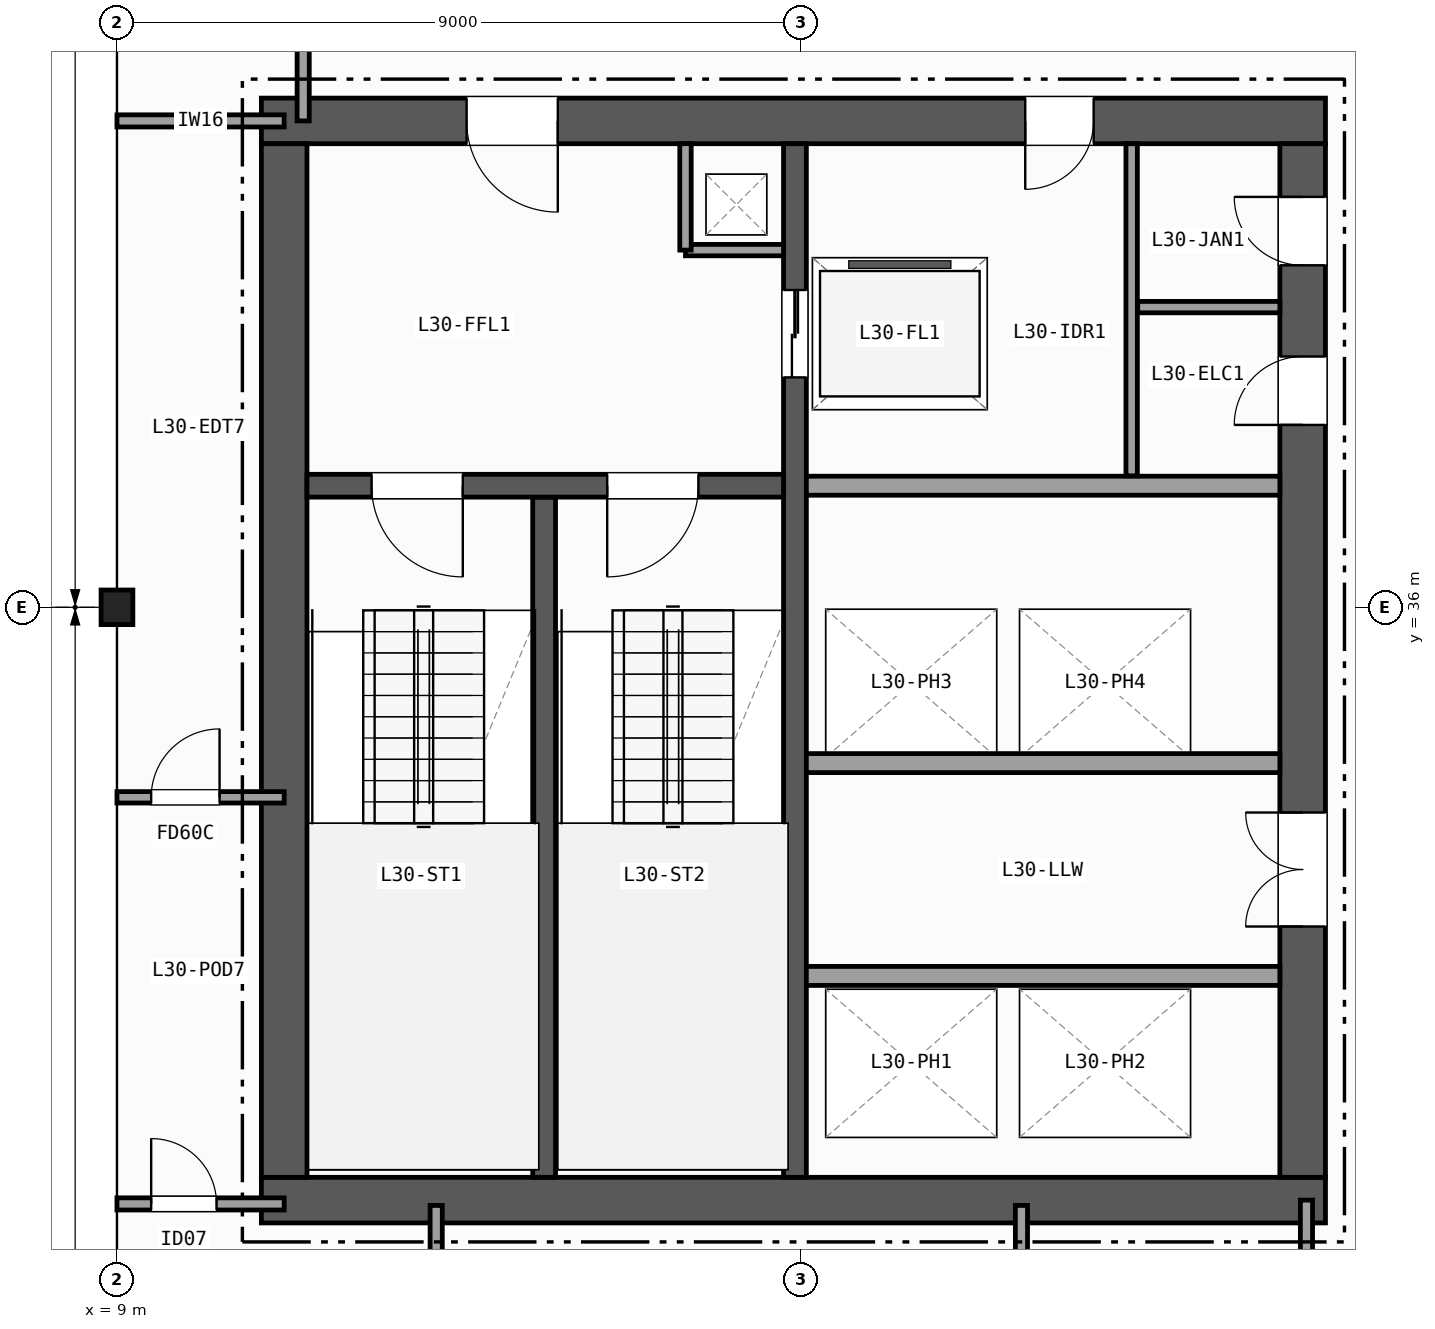
"""IFC4 building model, lengths in metres.
Left out: names, types, materials, properties, quantities, classifications, styles, units other than length and angle.
Written with IfcOpenShell. Run it as: python <this file> out.ifc"""

import sys

from ifc_helpers import new_model, si_unit, direction, frame, frame_2d, origin, origin_2d, place, context, subcontext, project, spatial, rectangle, i_section, extrude, element, fill, save


model = new_model("IFC4")
c1 = context("Model", 3, precision=1e-05, world=origin(), true_north=direction((0.0, 1.0)))
c2 = subcontext(c1, "Body", "Model", "MODEL_VIEW")
j1 = project(units=[si_unit("LENGTHUNIT", "METRE"), si_unit("PLANEANGLEUNIT", "RADIAN")], contexts=[c1])
p1 = place(None, origin())
s1 = spatial("IfcSite", under=j1, at=p1, CompositionType="ELEMENT")
p2 = place(p1, origin())
s2 = spatial("IfcBuilding", under=s1, at=p2, CompositionType="ELEMENT")
p3 = place(p2, frame((0.0, 0.0, 124.8)))
s3 = spatial("IfcBuildingStorey", under=s2, at=p3, CompositionType="ELEMENT", Elevation=124.8)
p4 = place(p3, frame((9.0, 36.0, 0.0), z_axis=(0.0, 0.0, 1.0), x_axis=(1.0, 0.0, 0.0)))
e1 = element("IfcColumn", 1, at=p4, inside=s3, PredefinedType="COLUMN", context=c2, shape_type="SweptSolid", body=[
    extrude(i_section(OverallWidth=0.418, OverallDepth=0.455, WebThickness=0.042, FlangeThickness=0.068, FilletRadius=0.015, at=origin_2d()), origin(), (0.0, 0.0, 1.0), 3.7),
])
p5 = place(p3, frame((10.9, 28.2, 0.0), z_axis=(0.0, 0.0, 1.0), x_axis=(1.0, 0.0, 0.0)))
e2 = element("IfcWall", 2, at=p5, inside=s3, PredefinedType="SHEAR", context=c2, shape_type="SweptSolid", body=[
    extrude(rectangle(XDim=14.0, YDim=0.6, at=frame_2d((7.0, 0.0))), origin(), (0.0, 0.0, 1.0), 3.42),
])
p6 = place(p3, frame((24.9, 42.4, 0.0), z_axis=(0.0, 0.0, 1.0), x_axis=(-1.0, 0.0, 0.0)))
e3 = element("IfcWall", 3, at=p6, inside=s3, PredefinedType="SHEAR", context=c2, shape_type="SweptSolid", body=[
    extrude(rectangle(XDim=14.0, YDim=0.6, at=frame_2d((7.0, 0.0))), origin(), (0.0, 0.0, 1.0), 3.42),
])
p7 = place(p6, frame((10.1, 0.0, 0.0)))
e4 = element("IfcOpeningElement", 4, at=p7, cuts=e3, PredefinedType="OPENING", context=c2, shape_type="SweptSolid", body=[
    extrude(rectangle(XDim=1.2, YDim=2.15, at=frame_2d((0.6, 1.075))), frame((0.0, 0.31, 0.0), z_axis=(0.0, -1.0, 0.0), x_axis=(1.0, 0.0, 0.0)), (0.0, 0.0, 1.0), 0.62),
])
p8 = place(p6, frame((3.05, 0.0, 0.0)))
e5 = element("IfcOpeningElement", 5, at=p8, cuts=e3, PredefinedType="OPENING", context=c2, shape_type="SweptSolid", body=[
    extrude(rectangle(XDim=0.9, YDim=2.1, at=frame_2d((0.45, 1.05))), frame((0.0, 0.31, 0.0), z_axis=(0.0, -1.0, 0.0), x_axis=(1.0, 0.0, 0.0)), (0.0, 0.0, 1.0), 0.62),
])
p9 = place(p3, frame((11.2, 42.1, 0.0), z_axis=(0.0, 0.0, 1.0), x_axis=(0.0, -1.0, 0.0)))
e6 = element("IfcWall", 6, at=p9, inside=s3, PredefinedType="SHEAR", context=c2, shape_type="SweptSolid", body=[
    extrude(rectangle(XDim=13.6, YDim=0.6, at=frame_2d((6.8, 0.0))), origin(), (0.0, 0.0, 1.0), 3.42),
])
p10 = place(p3, frame((24.6, 28.5, 0.0), z_axis=(0.0, 0.0, 1.0), x_axis=(0.0, 1.0, 0.0)))
e7 = element("IfcWall", 7, at=p10, inside=s3, PredefinedType="SHEAR", context=c2, shape_type="SweptSolid", body=[
    extrude(rectangle(XDim=13.6, YDim=0.6, at=frame_2d((6.8, 0.0))), origin(), (0.0, 0.0, 1.0), 3.42),
])
p11 = place(p10, frame((3.3, 0.0, 0.0)))
e8 = element("IfcOpeningElement", 8, at=p11, cuts=e7, PredefinedType="OPENING", context=c2, shape_type="SweptSolid", body=[
    extrude(rectangle(XDim=1.5, YDim=2.2, at=frame_2d((0.75, 1.1))), frame((0.0, 0.31, 0.0), z_axis=(0.0, -1.0, 0.0), x_axis=(1.0, 0.0, 0.0)), (0.0, 0.0, 1.0), 0.62),
])
p12 = place(p10, frame((9.9, 0.0, 0.0)))
e9 = element("IfcOpeningElement", 9, at=p12, cuts=e7, PredefinedType="OPENING", context=c2, shape_type="SweptSolid", body=[
    extrude(rectangle(XDim=0.9, YDim=2.1, at=frame_2d((0.45, 1.05))), frame((0.0, 0.31, 0.0), z_axis=(0.0, -1.0, 0.0), x_axis=(1.0, 0.0, 0.0)), (0.0, 0.0, 1.0), 0.62),
])
p13 = place(p10, frame((12.0, 0.0, 0.0)))
e10 = element("IfcOpeningElement", 10, at=p13, cuts=e7, PredefinedType="OPENING", context=c2, shape_type="SweptSolid", body=[
    extrude(rectangle(XDim=0.9, YDim=2.1, at=frame_2d((0.45, 1.05))), frame((0.0, 0.31, 0.0), z_axis=(0.0, -1.0, 0.0), x_axis=(1.0, 0.0, 0.0)), (0.0, 0.0, 1.0), 0.62),
])
p14 = place(p3, frame((14.62, 28.5, 0.0), z_axis=(0.0, 0.0, 1.0), x_axis=(0.0, 1.0, 0.0)))
e11 = element("IfcWall", 11, at=p14, inside=s3, PredefinedType="SHEAR", context=c2, shape_type="SweptSolid", body=[
    extrude(rectangle(XDim=8.95, YDim=0.3, at=frame_2d((4.475, 0.0))), origin(), (0.0, 0.0, 1.0), 3.42),
])
p15 = place(p3, frame((17.92, 42.1, 0.0), z_axis=(0.0, 0.0, 1.0), x_axis=(0.0, -1.0, 0.0)))
e12 = element("IfcWall", 12, at=p15, inside=s3, PredefinedType="SHEAR", context=c2, shape_type="SweptSolid", body=[
    extrude(rectangle(XDim=13.6, YDim=0.3, at=frame_2d((6.8, 0.0))), origin(), (0.0, 0.0, 1.0), 3.42),
])
p16 = place(p15, frame((1.925, 0.0, 0.0)))
e13 = element("IfcOpeningElement", 13, at=p16, cuts=e12, PredefinedType="OPENING", context=c2, shape_type="SweptSolid", body=[
    extrude(rectangle(XDim=1.15, YDim=2.15, at=frame_2d((0.575, 1.075))), frame((0.0, 0.16, 0.0), z_axis=(0.0, -1.0, 0.0), x_axis=(1.0, 0.0, 0.0)), (0.0, 0.0, 1.0), 0.32),
])
p17 = place(p3, frame((17.77, 37.6, 0.0), z_axis=(0.0, 0.0, 1.0), x_axis=(-1.0, 0.0, 0.0)))
e14 = element("IfcWall", 14, at=p17, inside=s3, PredefinedType="SHEAR", context=c2, shape_type="SweptSolid", body=[
    extrude(rectangle(XDim=6.27, YDim=0.3, at=frame_2d((3.135, 0.0))), origin(), (0.0, 0.0, 1.0), 3.42),
])
p18 = place(p17, frame((4.22, 0.0, 0.0)))
e15 = element("IfcOpeningElement", 15, at=p18, cuts=e14, PredefinedType="OPENING", context=c2, shape_type="SweptSolid", body=[
    extrude(rectangle(XDim=1.2, YDim=2.15, at=frame_2d((0.6, 1.075))), frame((0.0, 0.16, 0.0), z_axis=(0.0, -1.0, 0.0), x_axis=(1.0, 0.0, 0.0)), (0.0, 0.0, 1.0), 0.32),
])
p19 = place(p17, frame((1.12, 0.0, 0.0)))
e16 = element("IfcOpeningElement", 16, at=p19, cuts=e14, PredefinedType="OPENING", context=c2, shape_type="SweptSolid", body=[
    extrude(rectangle(XDim=1.2, YDim=2.15, at=frame_2d((0.6, 1.075))), frame((0.0, 0.16, 0.0), z_axis=(0.0, -1.0, 0.0), x_axis=(1.0, 0.0, 0.0)), (0.0, 0.0, 1.0), 0.32),
])
p20 = place(p3, frame((16.48, 40.7, 0.0), z_axis=(0.0, 0.0, 1.0), x_axis=(1.0, 0.0, 0.0)))
e17 = element("IfcWall", 17, at=p20, inside=s3, PredefinedType="PARTITIONING", context=c2, shape_type="SweptSolid", body=[
    extrude(rectangle(XDim=1.29, YDim=0.15, at=frame_2d((0.645, 0.0))), origin(), (0.0, 0.0, 1.0), 3.42),
])
p21 = place(p3, frame((16.48, 40.7, 0.0), z_axis=(0.0, 0.0, 1.0), x_axis=(0.0, 1.0, 0.0)))
e18 = element("IfcWall", 18, at=p21, inside=s3, PredefinedType="PARTITIONING", context=c2, shape_type="SweptSolid", body=[
    extrude(rectangle(XDim=1.4, YDim=0.15, at=frame_2d((0.7, 0.0))), origin(), (0.0, 0.0, 1.0), 3.42),
])
for number, where, z_axis, x_axis in (
    (19, (18.07, 37.6, 0.0), (0.0, 0.0, 1.0), (1.0, 0.0, 0.0)),
    (20, (18.07, 31.15, 0.0), (0.0, 0.0, 1.0), (1.0, 0.0, 0.0)),
    (21, (24.3, 33.95, 0.0), (0.0, 0.0, 1.0), (-1.0, 0.0, 0.0)),
):
    element("IfcWall", number, at=place(p3, frame(where, z_axis=z_axis, x_axis=x_axis)), inside=s3, PredefinedType="PARTITIONING", context=c2, shape_type="SweptSolid", body=[
        extrude(rectangle(XDim=6.23, YDim=0.25, at=frame_2d((3.115, 0.0))), origin(), (0.0, 0.0, 1.0), 3.42),
    ])
p22 = place(p3, frame((22.35, 37.73, 0.0), z_axis=(0.0, 0.0, 1.0), x_axis=(0.0, 1.0, 0.0)))
e22 = element("IfcWall", 22, at=p22, inside=s3, PredefinedType="PARTITIONING", context=c2, shape_type="SweptSolid", body=[
    extrude(rectangle(XDim=4.37, YDim=0.15, at=frame_2d((2.185, 0.0))), origin(), (0.0, 0.0, 1.0), 3.42),
])
p23 = place(p3, frame((22.43, 39.95, 0.0), z_axis=(0.0, 0.0, 1.0), x_axis=(1.0, 0.0, 0.0)))
e23 = element("IfcWall", 23, at=p23, inside=s3, PredefinedType="PARTITIONING", context=c2, shape_type="SweptSolid", body=[
    extrude(rectangle(XDim=1.87, YDim=0.15, at=frame_2d((0.935, 0.0))), origin(), (0.0, 0.0, 1.0), 3.42),
])
p24 = place(p3, frame((9.0, 28.15, 0.0), z_axis=(0.0, 0.0, 1.0), x_axis=(1.0, 0.0, 0.0)))
e24 = element("IfcWall", 24, at=p24, inside=s3, PredefinedType="PARTITIONING", context=c2, shape_type="SweptSolid", body=[
    extrude(rectangle(XDim=2.2, YDim=0.16, at=frame_2d((1.1, 0.0))), origin(), (0.0, 0.0, 1.0), 2.634),
])
p25 = place(p24, frame((0.45, 0.0, 0.0)))
e25 = element("IfcOpeningElement", 25, at=p25, cuts=e24, PredefinedType="OPENING", context=c2, shape_type="SweptSolid", body=[
    extrude(rectangle(XDim=0.86, YDim=2.05, at=frame_2d((0.43, 1.025))), frame((0.0, 0.09, 0.0), z_axis=(0.0, -1.0, 0.0), x_axis=(1.0, 0.0, 0.0)), (0.0, 0.0, 1.0), 0.18),
])
p26 = place(p3, frame((9.0, 42.4, 0.0), z_axis=(0.0, 0.0, 1.0), x_axis=(1.0, 0.0, 0.0)))
e26 = element("IfcWall", 26, at=p26, inside=s3, PredefinedType="PARTITIONING", context=c2, shape_type="SweptSolid", body=[
    extrude(rectangle(XDim=2.2, YDim=0.16, at=frame_2d((1.1, 0.0))), origin(), (0.0, 0.0, 1.0), 2.634),
])
p27 = place(p3, frame((11.45, 42.4, 0.0), z_axis=(0.0, 0.0, 1.0), x_axis=(0.0, 1.0, 0.0)))
e27 = element("IfcWall", 27, at=p27, inside=s3, PredefinedType="PARTITIONING", context=c2, shape_type="SweptSolid", body=[
    extrude(rectangle(XDim=2.1, YDim=0.16, at=frame_2d((1.05, 0.0))), origin(), (0.0, 0.0, 1.0), 3.42),
])
p28 = place(p3, frame((9.0, 33.5, 0.0), z_axis=(0.0, 0.0, 1.0), x_axis=(1.0, 0.0, 0.0)))
e28 = element("IfcWall", 28, at=p28, inside=s3, PredefinedType="PARTITIONING", context=c2, shape_type="SweptSolid", body=[
    extrude(rectangle(XDim=2.2, YDim=0.15, at=frame_2d((1.1, 0.0))), origin(), (0.0, 0.0, 1.0), 2.634),
])
p29 = place(p28, frame((0.45, 0.0, 0.0)))
e29 = element("IfcOpeningElement", 29, at=p29, cuts=e28, PredefinedType="OPENING", context=c2, shape_type="SweptSolid", body=[
    extrude(rectangle(XDim=0.9, YDim=2.1, at=frame_2d((0.45, 1.05))), frame((0.0, 0.085, 0.0), z_axis=(0.0, -1.0, 0.0), x_axis=(1.0, 0.0, 0.0)), (0.0, 0.0, 1.0), 0.17),
])
p30 = place(p3, frame((24.65, 9.0, 0.0), z_axis=(0.0, 0.0, 1.0), x_axis=(0.0, 1.0, 0.0)))
e30 = element("IfcWall", 30, at=p30, inside=s3, PredefinedType="PARTITIONING", context=c2, shape_type="SweptSolid", body=[
    extrude(rectangle(XDim=19.2, YDim=0.16, at=frame_2d((9.6, 0.0))), origin(), (0.0, 0.0, 1.0), 2.634),
])
p31 = place(p30, frame((12.2, 0.0, 0.0)))
e31 = element("IfcOpeningElement", 31, at=p31, cuts=e30, PredefinedType="OPENING", context=c2, shape_type="SweptSolid", body=[
    extrude(rectangle(XDim=1.0, YDim=2.1, at=frame_2d((0.5, 1.05))), frame((0.0, 0.09, 0.0), z_axis=(0.0, -1.0, 0.0), x_axis=(1.0, 0.0, 0.0)), (0.0, 0.0, 1.0), 0.18),
])
p32 = place(p30, frame((4.2, 0.0, 0.0)))
e32 = element("IfcOpeningElement", 32, at=p32, cuts=e30, PredefinedType="OPENING", context=c2, shape_type="SweptSolid", body=[
    extrude(rectangle(XDim=1.05, YDim=2.15, at=frame_2d((0.525, 1.075))), frame((0.0, 0.09, 0.0), z_axis=(0.0, -1.0, 0.0), x_axis=(1.0, 0.0, 0.0)), (0.0, 0.0, 1.0), 0.18),
])
p33 = place(p3, frame((13.2, 18.0, 0.0), z_axis=(0.0, 0.0, 1.0), x_axis=(0.0, 1.0, 0.0)))
e33 = element("IfcWall", 33, at=p33, inside=s3, PredefinedType="PARTITIONING", context=c2, shape_type="SweptSolid", body=[
    extrude(rectangle(XDim=10.13, YDim=0.16, at=frame_2d((5.065, 0.0))), origin(), (0.0, 0.0, 1.0), 2.789),
])
p34 = place(p33, frame((2.5, 0.0, 0.0)))
e34 = element("IfcOpeningElement", 34, at=p34, cuts=e33, PredefinedType="OPENING", context=c2, shape_type="SweptSolid", body=[
    extrude(rectangle(XDim=1.2, YDim=2.15, at=frame_2d((0.6, 1.075))), frame((0.0, 0.09, 0.0), z_axis=(0.0, -1.0, 0.0), x_axis=(1.0, 0.0, 0.0)), (0.0, 0.0, 1.0), 0.18),
])
p35 = place(p3, frame((20.9, 18.0, 0.0), z_axis=(0.0, 0.0, 1.0), x_axis=(0.0, 1.0, 0.0)))
e35 = element("IfcWall", 35, at=p35, inside=s3, PredefinedType="PARTITIONING", context=c2, shape_type="SweptSolid", body=[
    extrude(rectangle(XDim=10.13, YDim=0.16, at=frame_2d((5.065, 0.0))), origin(), (0.0, 0.0, 1.0), 2.789),
])
p36 = place(p35, frame((2.5, 0.0, 0.0)))
e36 = element("IfcOpeningElement", 36, at=p36, cuts=e35, PredefinedType="OPENING", context=c2, shape_type="SweptSolid", body=[
    extrude(rectangle(XDim=0.86, YDim=2.05, at=frame_2d((0.43, 1.025))), frame((0.0, 0.09, 0.0), z_axis=(0.0, -1.0, 0.0), x_axis=(1.0, 0.0, 0.0)), (0.0, 0.0, 1.0), 0.18),
])
p37 = place(p18, origin())
e37 = element("IfcDoor", 37, at=p37, inside=s3, OperationType="SINGLE_SWING_LEFT", PredefinedType="DOOR", context=c2, shape_type="SweptSolid", body=[
    extrude(rectangle(XDim=1.2, YDim=2.15, at=frame_2d((0.6, 1.075))), frame((0.0, 0.025, 0.0), z_axis=(0.0, -1.0, 0.0), x_axis=(1.0, 0.0, 0.0)), (0.0, 0.0, 1.0), 0.05),
])
fill(e15, e37)
p38 = place(p19, origin())
e38 = element("IfcDoor", 38, at=p38, inside=s3, OperationType="SINGLE_SWING_RIGHT", PredefinedType="DOOR", context=c2, shape_type="SweptSolid", body=[
    extrude(rectangle(XDim=1.2, YDim=2.15, at=frame_2d((0.6, 1.075))), frame((0.0, 0.025, 0.0), z_axis=(0.0, -1.0, 0.0), x_axis=(1.0, 0.0, 0.0)), (0.0, 0.0, 1.0), 0.05),
])
fill(e16, e38)
p39 = place(p11, origin())
e39 = element("IfcDoor", 39, at=p39, inside=s3, OperationType="DOUBLE_DOOR_SINGLE_SWING", PredefinedType="DOOR", context=c2, shape_type="SweptSolid", body=[
    extrude(rectangle(XDim=1.5, YDim=2.2, at=frame_2d((0.75, 1.1))), frame((0.0, 0.025, 0.0), z_axis=(0.0, -1.0, 0.0), x_axis=(1.0, 0.0, 0.0)), (0.0, 0.0, 1.0), 0.05),
])
fill(e8, e39)
p40 = place(p7, origin())
e40 = element("IfcDoor", 40, at=p40, inside=s3, OperationType="SINGLE_SWING_LEFT", PredefinedType="DOOR", context=c2, shape_type="SweptSolid", body=[
    extrude(rectangle(XDim=1.2, YDim=2.15, at=frame_2d((0.6, 1.075))), frame((0.0, 0.025, 0.0), z_axis=(0.0, -1.0, 0.0), x_axis=(1.0, 0.0, 0.0)), (0.0, 0.0, 1.0), 0.05),
])
fill(e4, e40)
p41 = place(p12, origin())
e41 = element("IfcDoor", 41, at=p41, inside=s3, OperationType="SINGLE_SWING_LEFT", PredefinedType="DOOR", context=c2, shape_type="SweptSolid", body=[
    extrude(rectangle(XDim=0.9, YDim=2.1, at=frame_2d((0.45, 1.05))), frame((0.0, 0.025, 0.0), z_axis=(0.0, -1.0, 0.0), x_axis=(1.0, 0.0, 0.0)), (0.0, 0.0, 1.0), 0.05),
])
fill(e9, e41)
p42 = place(p8, origin())
e42 = element("IfcDoor", 42, at=p42, inside=s3, OperationType="SINGLE_SWING_RIGHT", PredefinedType="DOOR", context=c2, shape_type="SweptSolid", body=[
    extrude(rectangle(XDim=0.9, YDim=2.1, at=frame_2d((0.45, 1.05))), frame((0.0, 0.025, 0.0), z_axis=(0.0, -1.0, 0.0), x_axis=(1.0, 0.0, 0.0)), (0.0, 0.0, 1.0), 0.05),
])
fill(e5, e42)
p43 = place(p13, origin())
e43 = element("IfcDoor", 43, at=p43, inside=s3, OperationType="SINGLE_SWING_RIGHT", PredefinedType="DOOR", context=c2, shape_type="SweptSolid", body=[
    extrude(rectangle(XDim=0.9, YDim=2.1, at=frame_2d((0.45, 1.05))), frame((0.0, 0.025, 0.0), z_axis=(0.0, -1.0, 0.0), x_axis=(1.0, 0.0, 0.0)), (0.0, 0.0, 1.0), 0.05),
])
fill(e10, e43)
p44 = place(p16, origin())
e44 = element("IfcDoor", 44, at=p44, inside=s3, OperationType="DOUBLE_DOOR_SLIDING", PredefinedType="DOOR", context=c2, shape_type="SweptSolid", body=[
    extrude(rectangle(XDim=1.15, YDim=2.15, at=frame_2d((0.575, 1.075))), frame((0.0, 0.025, 0.0), z_axis=(0.0, -1.0, 0.0), x_axis=(1.0, 0.0, 0.0)), (0.0, 0.0, 1.0), 0.05),
])
fill(e13, e44)
p45 = place(p25, origin())
e45 = element("IfcDoor", 45, at=p45, inside=s3, OperationType="SINGLE_SWING_LEFT", PredefinedType="DOOR", context=c2, shape_type="SweptSolid", body=[
    extrude(rectangle(XDim=0.86, YDim=2.05, at=frame_2d((0.43, 1.025))), frame((0.0, 0.025, 0.0), z_axis=(0.0, -1.0, 0.0), x_axis=(1.0, 0.0, 0.0)), (0.0, 0.0, 1.0), 0.05),
])
fill(e25, e45)
p46 = place(p29, origin())
e46 = element("IfcDoor", 46, at=p46, inside=s3, OperationType="SINGLE_SWING_RIGHT", PredefinedType="DOOR", context=c2, shape_type="SweptSolid", body=[
    extrude(rectangle(XDim=0.9, YDim=2.1, at=frame_2d((0.45, 1.05))), frame((0.0, 0.025, 0.0), z_axis=(0.0, -1.0, 0.0), x_axis=(1.0, 0.0, 0.0)), (0.0, 0.0, 1.0), 0.05),
])
fill(e29, e46)
save(model, sys.argv[1])
